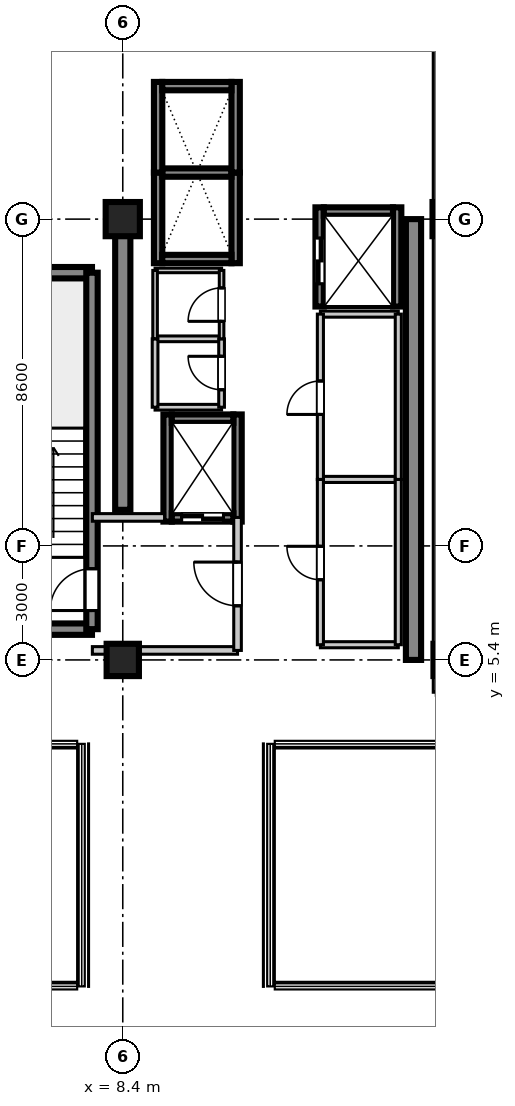
"""IFC4 building model, lengths in metres.
Left out: names, types, materials, properties, quantities, classifications, styles, units other than length and angle.
Written with IfcOpenShell. Run it as: python <this file> out.ifc"""

import sys

from ifc_helpers import new_model, si_unit, direction, frame, frame_2d, origin, origin_2d, place, context, subcontext, project, spatial, rectangle, extrude, source, transform, mapped, element, fill, save


model = new_model("IFC4")
c1 = context("Model", 3, precision=1e-05, world=origin(), true_north=direction((0.0, 1.0)))
c2 = subcontext(c1, "Body", "Model", "MODEL_VIEW")
j1 = project(units=[si_unit("LENGTHUNIT", "METRE"), si_unit("PLANEANGLEUNIT", "RADIAN")], contexts=[c1])
p1 = place(None, origin())
s1 = spatial("IfcSite", under=j1, at=p1, CompositionType="ELEMENT")
p2 = place(p1, origin())
s2 = spatial("IfcBuilding", under=s1, at=p2, CompositionType="ELEMENT")
p3 = place(p2, frame((0.0, 0.0, 311.9)))
s3 = spatial("IfcBuildingStorey", under=s2, at=p3, CompositionType="ELEMENT", Elevation=311.9)
m1 = source(origin(), c2, "Body", "SweptSolid", [
    extrude(rectangle(XDim=0.85, YDim=0.85, at=origin_2d()), origin(), (0.0, 0.0, 1.0), 3.805),
])
p4 = place(p3, frame((8.4, 5.4, 0.0), z_axis=(0.0, 0.0, 1.0), x_axis=(1.0, 0.0, 0.0)))
e1 = element("IfcColumn", 1, at=p4, inside=s3, PredefinedType="PILASTER", context=c2, shape_type="MappedRepresentation", body=[
    mapped(m1, transform((0.0, 0.0, 0.0), scale=1.0)),
])
m2 = source(origin(), c2, "Body", "SweptSolid", [
    extrude(rectangle(XDim=0.9, YDim=0.9, at=origin_2d()), origin(), (0.0, 0.0, 1.0), 3.805),
])
p5 = place(p3, frame((8.4, 17.0, 0.0), z_axis=(0.0, 0.0, 1.0), x_axis=(1.0, 0.0, 0.0)))
e2 = element("IfcColumn", 2, at=p5, inside=s3, PredefinedType="COLUMN", context=c2, shape_type="MappedRepresentation", body=[
    mapped(m2, transform((0.0, 0.0, 0.0), scale=1.0)),
])
p6 = place(p3, frame((17.0, 5.4, 0.0), z_axis=(0.0, 0.0, 1.0), x_axis=(1.0, 0.0, 0.0)))
e3 = element("IfcColumn", 3, at=p6, inside=s3, PredefinedType="PILASTER", context=c2, shape_type="MappedRepresentation", body=[
    mapped(m1, transform((0.0, 0.0, 0.0), scale=1.0)),
])
p7 = place(p3, frame((17.0, 17.0, 0.0), z_axis=(0.0, 0.0, 1.0), x_axis=(1.0, 0.0, 0.0)))
e4 = element("IfcColumn", 4, at=p7, inside=s3, PredefinedType="COLUMN", context=c2, shape_type="MappedRepresentation", body=[
    mapped(m2, transform((0.0, 0.0, 0.0), scale=1.0)),
])
m3 = source(origin(), c2, "Body", "SweptSolid", [
    extrude(rectangle(XDim=7.65, YDim=0.4, at=frame_2d((3.825, 0.0))), origin(), (0.0, 0.0, 1.0), 3.55),
])
p8 = place(p3, frame((8.4, 9.35, 0.0), z_axis=(0.0, 0.0, 1.0), x_axis=(0.0, 1.0, 0.0)))
e5 = element("IfcWall", 5, at=p8, inside=s3, PredefinedType="SHEAR", context=c2, shape_type="MappedRepresentation", body=[
    mapped(m3, transform((0.0, 0.0, 0.0), scale=1.0)),
])
m4 = source(origin(), c2, "Body", "SweptSolid", [
    extrude(rectangle(XDim=11.6, YDim=0.4, at=frame_2d((5.8, 0.0))), origin(), (0.0, 0.0, 1.0), 3.55),
])
p9 = place(p3, frame((16.05, 5.4, 0.0), z_axis=(0.0, 0.0, 1.0), x_axis=(0.0, 1.0, 0.0)))
e6 = element("IfcWall", 6, at=p9, inside=s3, PredefinedType="SHEAR", context=c2, shape_type="MappedRepresentation", body=[
    mapped(m4, transform((0.0, 0.0, 0.0), scale=1.0)),
])
m5 = source(origin(), c2, "Body", "SweptSolid", [
    extrude(rectangle(XDim=3.98, YDim=0.3, at=frame_2d((1.99, 0.0))), origin(), (0.0, 0.0, 1.0), 3.55),
])
for number, where, z_axis, x_axis in (
    (7, (3.61, 6.21, 0.0), (0.0, 0.0, 1.0), (1.0, 0.0, 0.0)),
    (8, (3.61, 15.59, 0.0), (0.0, 0.0, 1.0), (1.0, 0.0, 0.0)),
):
    element("IfcWall", number, at=place(p3, frame(where, z_axis=z_axis, x_axis=x_axis)), inside=s3, PredefinedType="SHEAR", context=c2, shape_type="MappedRepresentation", body=[
        mapped(m5, transform((0.0, 0.0, 0.0), scale=1.0)),
    ])
m6 = source(origin(), c2, "Body", "SweptSolid", [
    extrude(rectangle(XDim=9.38, YDim=0.3, at=frame_2d((4.69, 0.0))), origin(), (0.0, 0.0, 1.0), 3.55),
])
p10 = place(p3, frame((7.59, 6.21, 0.0), z_axis=(0.0, 0.0, 1.0), x_axis=(0.0, 1.0, 0.0)))
e9 = element("IfcWall", 9, at=p10, inside=s3, PredefinedType="SHEAR", context=c2, shape_type="MappedRepresentation", body=[
    mapped(m6, transform((0.0, 0.0, 0.0), scale=1.0)),
])
p11 = place(p10, frame((0.49, 0.0, 0.0)))
e10 = element("IfcOpeningElement", 10, at=p11, cuts=e9, PredefinedType="OPENING", context=c2, shape_type="SweptSolid", body=[
    extrude(rectangle(XDim=1.1, YDim=2.15, at=frame_2d((0.55, 1.075))), frame((0.0, 0.16, 0.0), z_axis=(0.0, -1.0, 0.0), x_axis=(1.0, 0.0, 0.0)), (0.0, 0.0, 1.0), 0.32),
])
m7 = source(origin(), c2, "Body", "SweptSolid", [
    extrude(rectangle(XDim=2.385, YDim=0.22, at=frame_2d((1.192, 0.0))), origin(), (0.0, 0.0, 1.0), 3.55),
])
for number, where, z_axis, x_axis in (
    (11, (9.33, 15.84, 0.0), (0.0, 0.0, 1.0), (0.0, 1.0, 0.0)),
    (12, (11.37, 15.84, 0.0), (0.0, 0.0, 1.0), (0.0, 1.0, 0.0)),
):
    element("IfcWall", number, at=place(p3, frame(where, z_axis=z_axis, x_axis=x_axis)), inside=s3, PredefinedType="SHEAR", context=c2, shape_type="MappedRepresentation", body=[
        mapped(m7, transform((0.0, 0.0, 0.0), scale=1.0)),
    ])
m8 = source(origin(), c2, "Body", "SweptSolid", [
    extrude(rectangle(XDim=1.82, YDim=0.22, at=frame_2d((0.91, 0.0))), origin(), (0.0, 0.0, 1.0), 3.55),
])
p12 = place(p3, frame((9.44, 15.95, 0.0), z_axis=(0.0, 0.0, 1.0), x_axis=(1.0, 0.0, 0.0)))
e13 = element("IfcWall", 13, at=p12, inside=s3, PredefinedType="SHEAR", context=c2, shape_type="MappedRepresentation", body=[
    mapped(m8, transform((0.0, 0.0, 0.0), scale=1.0)),
])
m9 = source(origin(), c2, "Body", "SweptSolid", [
    extrude(rectangle(XDim=1.82, YDim=0.22, at=frame_2d((0.91, 0.0))), origin(), (0.0, 0.0, 1.0), 3.85),
])
p13 = place(p3, frame((9.44, 18.225, 0.0), z_axis=(0.0, 0.0, 1.0), x_axis=(1.0, 0.0, 0.0)))
e14 = element("IfcWall", 14, at=p13, inside=s3, PredefinedType="SHEAR", context=c2, shape_type="MappedRepresentation", body=[
    mapped(m9, transform((0.0, 0.0, 0.0), scale=1.0)),
])
for number, where, z_axis, x_axis in (
    (15, (9.33, 18.225, 0.0), (0.0, 0.0, 1.0), (0.0, 1.0, 0.0)),
    (16, (11.37, 18.225, 0.0), (0.0, 0.0, 1.0), (0.0, 1.0, 0.0)),
):
    element("IfcWall", number, at=place(p3, frame(where, z_axis=z_axis, x_axis=x_axis)), inside=s3, PredefinedType="SHEAR", context=c2, shape_type="MappedRepresentation", body=[
        mapped(m7, transform((0.0, 0.0, 0.0), scale=1.0)),
    ])
p14 = place(p3, frame((9.44, 20.5, 0.0), z_axis=(0.0, 0.0, 1.0), x_axis=(1.0, 0.0, 0.0)))
e17 = element("IfcWall", 17, at=p14, inside=s3, PredefinedType="SHEAR", context=c2, shape_type="MappedRepresentation", body=[
    mapped(m8, transform((0.0, 0.0, 0.0), scale=1.0)),
])
m10 = source(origin(), c2, "Body", "SweptSolid", [
    extrude(rectangle(XDim=2.82, YDim=0.22, at=frame_2d((1.41, 0.0))), origin(), (0.0, 0.0, 1.0), 3.55),
])
for number, where, z_axis, x_axis in (
    (18, (9.58, 9.04, 0.0), (0.0, 0.0, 1.0), (0.0, 1.0, 0.0)),
    (19, (11.42, 9.04, 0.0), (0.0, 0.0, 1.0), (0.0, 1.0, 0.0)),
):
    element("IfcWall", number, at=place(p3, frame(where, z_axis=z_axis, x_axis=x_axis)), inside=s3, PredefinedType="SHEAR", context=c2, shape_type="MappedRepresentation", body=[
        mapped(m10, transform((0.0, 0.0, 0.0), scale=1.0)),
    ])
m11 = source(origin(), c2, "Body", "SweptSolid", [
    extrude(rectangle(XDim=1.62, YDim=0.22, at=frame_2d((0.81, 0.0))), origin(), (0.0, 0.0, 1.0), 3.55),
])
p15 = place(p3, frame((9.69, 9.15, 0.0), z_axis=(0.0, 0.0, 1.0), x_axis=(1.0, 0.0, 0.0)))
e20 = element("IfcWall", 20, at=p15, inside=s3, PredefinedType="SHEAR", context=c2, shape_type="MappedRepresentation", body=[
    mapped(m11, transform((0.0, 0.0, 0.0), scale=1.0)),
])
p16 = place(p15, frame((0.26, 0.0, 0.0)))
e21 = element("IfcOpeningElement", 21, at=p16, cuts=e20, PredefinedType="OPENING", context=c2, shape_type="SweptSolid", body=[
    extrude(rectangle(XDim=1.1, YDim=2.2, at=frame_2d((0.55, 1.1))), frame((0.0, 0.12, 0.0), z_axis=(0.0, -1.0, 0.0), x_axis=(1.0, 0.0, 0.0)), (0.0, 0.0, 1.0), 0.24),
])
p17 = place(p3, frame((9.69, 11.75, 0.0), z_axis=(0.0, 0.0, 1.0), x_axis=(1.0, 0.0, 0.0)))
e22 = element("IfcWall", 22, at=p17, inside=s3, PredefinedType="SHEAR", context=c2, shape_type="MappedRepresentation", body=[
    mapped(m11, transform((0.0, 0.0, 0.0), scale=1.0)),
])
m12 = source(origin(), c2, "Body", "SweptSolid", [
    extrude(rectangle(XDim=2.61, YDim=0.22, at=frame_2d((1.305, 0.0))), origin(), (0.0, 0.0, 1.0), 3.55),
])
p18 = place(p3, frame((13.58, 14.7, 0.0), z_axis=(0.0, 0.0, 1.0), x_axis=(0.0, 1.0, 0.0)))
e23 = element("IfcWall", 23, at=p18, inside=s3, PredefinedType="SHEAR", context=c2, shape_type="MappedRepresentation", body=[
    mapped(m12, transform((0.0, 0.0, 0.0), scale=1.0)),
])
p19 = place(p18, frame((0.6, 0.0, 0.0)))
e24 = element("IfcOpeningElement", 24, at=p19, cuts=e23, PredefinedType="OPENING", context=c2, shape_type="SweptSolid", body=[
    extrude(rectangle(XDim=1.2, YDim=2.2, at=frame_2d((0.6, 1.1))), frame((0.0, 0.12, 0.0), z_axis=(0.0, -1.0, 0.0), x_axis=(1.0, 0.0, 0.0)), (0.0, 0.0, 1.0), 0.24),
])
p20 = place(p3, frame((15.62, 14.7, 0.0), z_axis=(0.0, 0.0, 1.0), x_axis=(0.0, 1.0, 0.0)))
e25 = element("IfcWall", 25, at=p20, inside=s3, PredefinedType="SHEAR", context=c2, shape_type="MappedRepresentation", body=[
    mapped(m12, transform((0.0, 0.0, 0.0), scale=1.0)),
])
p21 = place(p3, frame((13.69, 17.2, 0.0), z_axis=(0.0, 0.0, 1.0), x_axis=(1.0, 0.0, 0.0)))
e26 = element("IfcWall", 26, at=p21, inside=s3, PredefinedType="SHEAR", context=c2, shape_type="MappedRepresentation", body=[
    mapped(m8, transform((0.0, 0.0, 0.0), scale=1.0)),
])
m13 = source(origin(), c2, "Body", "SweptSolid", [
    extrude(rectangle(XDim=3.82, YDim=0.2, at=frame_2d((1.91, 0.0))), origin(), (0.0, 0.0, 1.0), 2.89),
])
p22 = place(p3, frame((7.6, 5.65, 0.0), z_axis=(0.0, 0.0, 1.0), x_axis=(1.0, 0.0, 0.0)))
e27 = element("IfcWall", 27, at=p22, inside=s3, PredefinedType="PARTITIONING", context=c2, shape_type="MappedRepresentation", body=[
    mapped(m13, transform((0.0, 0.0, 0.0), scale=1.0)),
])
m14 = source(origin(), c2, "Body", "SweptSolid", [
    extrude(rectangle(XDim=1.9, YDim=0.2, at=frame_2d((0.95, 0.0))), origin(), (0.0, 0.0, 1.0), 2.89),
])
p23 = place(p3, frame((7.6, 9.15, 0.0), z_axis=(0.0, 0.0, 1.0), x_axis=(1.0, 0.0, 0.0)))
e28 = element("IfcWall", 28, at=p23, inside=s3, PredefinedType="PARTITIONING", context=c2, shape_type="MappedRepresentation", body=[
    mapped(m14, transform((0.0, 0.0, 0.0), scale=1.0)),
])
m15 = source(origin(), c2, "Body", "SweptSolid", [
    extrude(rectangle(XDim=3.5, YDim=0.2, at=frame_2d((1.75, 0.0))), origin(), (0.0, 0.0, 1.0), 2.89),
])
p24 = place(p3, frame((11.42, 5.65, 0.0), z_axis=(0.0, 0.0, 1.0), x_axis=(0.0, 1.0, 0.0)))
e29 = element("IfcWall", 29, at=p24, inside=s3, PredefinedType="PARTITIONING", context=c2, shape_type="MappedRepresentation", body=[
    mapped(m15, transform((0.0, 0.0, 0.0), scale=1.0)),
])
p25 = place(p24, frame((1.175, 0.0, 0.0)))
e30 = element("IfcOpeningElement", 30, at=p25, cuts=e29, PredefinedType="OPENING", context=c2, shape_type="SweptSolid", body=[
    extrude(rectangle(XDim=1.15, YDim=2.15, at=frame_2d((0.575, 1.075))), frame((0.0, 0.11, 0.0), z_axis=(0.0, -1.0, 0.0), x_axis=(1.0, 0.0, 0.0)), (0.0, 0.0, 1.0), 0.22),
])
m16 = source(origin(), c2, "Body", "SweptSolid", [
    extrude(rectangle(XDim=1.75, YDim=0.15, at=frame_2d((0.875, 0.0))), origin(), (0.0, 0.0, 1.0), 2.89),
])
for number, where, z_axis, x_axis in (
    (31, (9.25, 12.05, 0.0), (0.0, 0.0, 1.0), (1.0, 0.0, 0.0)),
    (32, (9.25, 13.85, 0.0), (0.0, 0.0, 1.0), (1.0, 0.0, 0.0)),
):
    element("IfcWall", number, at=place(p3, frame(where, z_axis=z_axis, x_axis=x_axis)), inside=s3, PredefinedType="PARTITIONING", context=c2, shape_type="MappedRepresentation", body=[
        mapped(m16, transform((0.0, 0.0, 0.0), scale=1.0)),
    ])
m17 = source(origin(), c2, "Body", "SweptSolid", [
    extrude(rectangle(XDim=1.8, YDim=0.15, at=frame_2d((0.9, 0.0))), origin(), (0.0, 0.0, 1.0), 2.89),
])
p26 = place(p3, frame((9.25, 12.05, 0.0), z_axis=(0.0, 0.0, 1.0), x_axis=(0.0, 1.0, 0.0)))
e33 = element("IfcWall", 33, at=p26, inside=s3, PredefinedType="PARTITIONING", context=c2, shape_type="MappedRepresentation", body=[
    mapped(m17, transform((0.0, 0.0, 0.0), scale=1.0)),
])
p27 = place(p3, frame((11.0, 12.05, 0.0), z_axis=(0.0, 0.0, 1.0), x_axis=(0.0, 1.0, 0.0)))
e34 = element("IfcWall", 34, at=p27, inside=s3, PredefinedType="PARTITIONING", context=c2, shape_type="MappedRepresentation", body=[
    mapped(m17, transform((0.0, 0.0, 0.0), scale=1.0)),
])
p28 = place(p27, frame((0.46, 0.0, 0.0)))
e35 = element("IfcOpeningElement", 35, at=p28, cuts=e34, PredefinedType="OPENING", context=c2, shape_type="SweptSolid", body=[
    extrude(rectangle(XDim=0.88, YDim=2.1, at=frame_2d((0.44, 1.05))), frame((0.0, 0.085, 0.0), z_axis=(0.0, -1.0, 0.0), x_axis=(1.0, 0.0, 0.0)), (0.0, 0.0, 1.0), 0.17),
])
m18 = source(origin(), c2, "Body", "SweptSolid", [
    extrude(rectangle(XDim=1.75, YDim=0.12, at=frame_2d((0.875, 0.0))), origin(), (0.0, 0.0, 1.0), 2.89),
])
p29 = place(p3, frame((9.25, 15.65, 0.0), z_axis=(0.0, 0.0, 1.0), x_axis=(1.0, 0.0, 0.0)))
e36 = element("IfcWall", 36, at=p29, inside=s3, PredefinedType="PARTITIONING", context=c2, shape_type="MappedRepresentation", body=[
    mapped(m18, transform((0.0, 0.0, 0.0), scale=1.0)),
])
m19 = source(origin(), c2, "Body", "SweptSolid", [
    extrude(rectangle(XDim=1.8, YDim=0.12, at=frame_2d((0.9, 0.0))), origin(), (0.0, 0.0, 1.0), 2.89),
])
p30 = place(p3, frame((9.25, 13.85, 0.0), z_axis=(0.0, 0.0, 1.0), x_axis=(0.0, 1.0, 0.0)))
e37 = element("IfcWall", 37, at=p30, inside=s3, PredefinedType="PARTITIONING", context=c2, shape_type="MappedRepresentation", body=[
    mapped(m19, transform((0.0, 0.0, 0.0), scale=1.0)),
])
p31 = place(p3, frame((11.0, 13.85, 0.0), z_axis=(0.0, 0.0, 1.0), x_axis=(0.0, 1.0, 0.0)))
e38 = element("IfcWall", 38, at=p31, inside=s3, PredefinedType="PARTITIONING", context=c2, shape_type="MappedRepresentation", body=[
    mapped(m19, transform((0.0, 0.0, 0.0), scale=1.0)),
])
p32 = place(p31, frame((0.46, 0.0, 0.0)))
e39 = element("IfcOpeningElement", 39, at=p32, cuts=e38, PredefinedType="OPENING", context=c2, shape_type="SweptSolid", body=[
    extrude(rectangle(XDim=0.88, YDim=2.1, at=frame_2d((0.44, 1.05))), frame((0.0, 0.07, 0.0), z_axis=(0.0, -1.0, 0.0), x_axis=(1.0, 0.0, 0.0)), (0.0, 0.0, 1.0), 0.14),
])
m20 = source(origin(), c2, "Body", "SweptSolid", [
    extrude(rectangle(XDim=2.05, YDim=0.16, at=frame_2d((1.025, 0.0))), origin(), (0.0, 0.0, 1.0), 2.89),
])
for number, where, z_axis, x_axis in (
    (40, (13.6, 5.8, 0.0), (0.0, 0.0, 1.0), (1.0, 0.0, 0.0)),
    (41, (13.6, 10.15, 0.0), (0.0, 0.0, 1.0), (1.0, 0.0, 0.0)),
):
    element("IfcWall", number, at=place(p3, frame(where, z_axis=z_axis, x_axis=x_axis)), inside=s3, PredefinedType="PARTITIONING", context=c2, shape_type="MappedRepresentation", body=[
        mapped(m20, transform((0.0, 0.0, 0.0), scale=1.0)),
    ])
m21 = source(origin(), c2, "Body", "SweptSolid", [
    extrude(rectangle(XDim=4.35, YDim=0.16, at=frame_2d((2.175, 0.0))), origin(), (0.0, 0.0, 1.0), 2.89),
])
p33 = place(p3, frame((13.6, 5.8, 0.0), z_axis=(0.0, 0.0, 1.0), x_axis=(0.0, 1.0, 0.0)))
e42 = element("IfcWall", 42, at=p33, inside=s3, PredefinedType="PARTITIONING", context=c2, shape_type="MappedRepresentation", body=[
    mapped(m21, transform((0.0, 0.0, 0.0), scale=1.0)),
])
p34 = place(p33, frame((1.71, 0.0, 0.0)))
e43 = element("IfcOpeningElement", 43, at=p34, cuts=e42, PredefinedType="OPENING", context=c2, shape_type="SweptSolid", body=[
    extrude(rectangle(XDim=0.88, YDim=2.1, at=frame_2d((0.44, 1.05))), frame((0.0, 0.09, 0.0), z_axis=(0.0, -1.0, 0.0), x_axis=(1.0, 0.0, 0.0)), (0.0, 0.0, 1.0), 0.18),
])
p35 = place(p3, frame((15.65, 5.8, 0.0), z_axis=(0.0, 0.0, 1.0), x_axis=(0.0, 1.0, 0.0)))
e44 = element("IfcWall", 44, at=p35, inside=s3, PredefinedType="PARTITIONING", context=c2, shape_type="MappedRepresentation", body=[
    mapped(m21, transform((0.0, 0.0, 0.0), scale=1.0)),
])
p36 = place(p3, frame((13.6, 14.5, 0.0), z_axis=(0.0, 0.0, 1.0), x_axis=(1.0, 0.0, 0.0)))
e45 = element("IfcWall", 45, at=p36, inside=s3, PredefinedType="PARTITIONING", context=c2, shape_type="MappedRepresentation", body=[
    mapped(m20, transform((0.0, 0.0, 0.0), scale=1.0)),
])
m22 = source(origin(), c2, "Body", "SweptSolid", [
    extrude(rectangle(XDim=4.35, YDim=0.16, at=frame_2d((2.175, 0.0))), origin(), (0.0, 0.0, 1.0), 2.89),
])
p37 = place(p3, frame((13.6, 10.15, 0.0), z_axis=(0.0, 0.0, 1.0), x_axis=(0.0, 1.0, 0.0)))
e46 = element("IfcWall", 46, at=p37, inside=s3, PredefinedType="PARTITIONING", context=c2, shape_type="MappedRepresentation", body=[
    mapped(m22, transform((0.0, 0.0, 0.0), scale=1.0)),
])
p38 = place(p37, frame((1.71, 0.0, 0.0)))
e47 = element("IfcOpeningElement", 47, at=p38, cuts=e46, PredefinedType="OPENING", context=c2, shape_type="SweptSolid", body=[
    extrude(rectangle(XDim=0.88, YDim=2.1, at=frame_2d((0.44, 1.05))), frame((0.0, 0.09, 0.0), z_axis=(0.0, -1.0, 0.0), x_axis=(1.0, 0.0, 0.0)), (0.0, 0.0, 1.0), 0.18),
])
p39 = place(p3, frame((15.65, 10.15, 0.0), z_axis=(0.0, 0.0, 1.0), x_axis=(0.0, 1.0, 0.0)))
e48 = element("IfcWall", 48, at=p39, inside=s3, PredefinedType="PARTITIONING", context=c2, shape_type="MappedRepresentation", body=[
    mapped(m22, transform((0.0, 0.0, 0.0), scale=1.0)),
])
m23 = source(origin(), c2, "Body", "SweptSolid", [
    extrude(rectangle(XDim=17.95, YDim=0.16, at=frame_2d((8.975, 0.0))), origin(), (0.0, 0.0, 1.0), 2.89),
])
p40 = place(p3, frame((16.65, 4.55, 0.0), z_axis=(0.0, 0.0, 1.0), x_axis=(0.0, 1.0, 0.0)))
e49 = element("IfcWall", 49, at=p40, inside=s3, PredefinedType="PARTITIONING", context=c2, shape_type="MappedRepresentation", body=[
    mapped(m23, transform((0.0, 0.0, 0.0), scale=1.0)),
])
m24 = source(origin(), c2, "Body", "SweptSolid", [
    extrude(rectangle(XDim=1.1, YDim=2.15, at=frame_2d((0.55, 1.075))), frame((0.0, 0.025, 0.0), z_axis=(0.0, -1.0, 0.0), x_axis=(1.0, 0.0, 0.0)), (0.0, 0.0, 1.0), 0.05),
])
p41 = place(p11, origin())
e50 = element("IfcDoor", 50, at=p41, inside=s3, OperationType="SINGLE_SWING_LEFT", PredefinedType="DOOR", context=c2, shape_type="MappedRepresentation", body=[
    mapped(m24, transform((0.0, 0.0, 0.0), scale=1.0)),
])
fill(e10, e50)
m25 = source(origin(), c2, "Body", "SweptSolid", [
    extrude(rectangle(XDim=1.1, YDim=2.2, at=frame_2d((0.55, 1.1))), frame((0.0, 0.025, 0.0), z_axis=(0.0, -1.0, 0.0), x_axis=(1.0, 0.0, 0.0)), (0.0, 0.0, 1.0), 0.05),
])
p42 = place(p16, frame((1.1, 0.0, 0.0), z_axis=(0.0, 0.0, 1.0), x_axis=(-1.0, 0.0, 0.0)))
e51 = element("IfcDoor", 51, at=p42, inside=s3, OperationType="DOUBLE_DOOR_SLIDING", PredefinedType="DOOR", context=c2, shape_type="MappedRepresentation", body=[
    mapped(m25, transform((0.0, 0.0, 0.0), scale=1.0)),
])
fill(e21, e51)
m26 = source(origin(), c2, "Body", "SweptSolid", [
    extrude(rectangle(XDim=1.2, YDim=2.2, at=frame_2d((0.6, 1.1))), frame((0.0, 0.025, 0.0), z_axis=(0.0, -1.0, 0.0), x_axis=(1.0, 0.0, 0.0)), (0.0, 0.0, 1.0), 0.05),
])
p43 = place(p19, origin())
e52 = element("IfcDoor", 52, at=p43, inside=s3, OperationType="DOUBLE_DOOR_SLIDING", PredefinedType="DOOR", context=c2, shape_type="MappedRepresentation", body=[
    mapped(m26, transform((0.0, 0.0, 0.0), scale=1.0)),
])
fill(e24, e52)
m27 = source(origin(), c2, "Body", "SweptSolid", [
    extrude(rectangle(XDim=1.15, YDim=2.15, at=frame_2d((0.575, 1.075))), frame((0.0, 0.025, 0.0), z_axis=(0.0, -1.0, 0.0), x_axis=(1.0, 0.0, 0.0)), (0.0, 0.0, 1.0), 0.05),
])
p44 = place(p25, frame((1.15, 0.0, 0.0), z_axis=(0.0, 0.0, 1.0), x_axis=(-1.0, 0.0, 0.0)))
e53 = element("IfcDoor", 53, at=p44, inside=s3, OperationType="SINGLE_SWING_RIGHT", PredefinedType="DOOR", context=c2, shape_type="MappedRepresentation", body=[
    mapped(m27, transform((0.0, 0.0, 0.0), scale=1.0)),
])
fill(e30, e53)
m28 = source(origin(), c2, "Body", "SweptSolid", [
    extrude(rectangle(XDim=0.88, YDim=2.1, at=frame_2d((0.44, 1.05))), frame((0.0, 0.025, 0.0), z_axis=(0.0, -1.0, 0.0), x_axis=(1.0, 0.0, 0.0)), (0.0, 0.0, 1.0), 0.05),
])
p45 = place(p28, origin())
e54 = element("IfcDoor", 54, at=p45, inside=s3, OperationType="SINGLE_SWING_RIGHT", PredefinedType="DOOR", context=c2, shape_type="MappedRepresentation", body=[
    mapped(m28, transform((0.0, 0.0, 0.0), scale=1.0)),
])
fill(e35, e54)
p46 = place(p32, origin())
e55 = element("IfcDoor", 55, at=p46, inside=s3, OperationType="SINGLE_SWING_LEFT", PredefinedType="DOOR", context=c2, shape_type="MappedRepresentation", body=[
    mapped(m28, transform((0.0, 0.0, 0.0), scale=1.0)),
])
fill(e39, e55)
p47 = place(p34, frame((0.88, 0.0, 0.0), z_axis=(0.0, 0.0, 1.0), x_axis=(-1.0, 0.0, 0.0)))
e56 = element("IfcDoor", 56, at=p47, inside=s3, OperationType="SINGLE_SWING_RIGHT", PredefinedType="DOOR", context=c2, shape_type="MappedRepresentation", body=[
    mapped(m28, transform((0.0, 0.0, 0.0), scale=1.0)),
])
fill(e43, e56)
p48 = place(p38, frame((0.88, 0.0, 0.0), z_axis=(0.0, 0.0, 1.0), x_axis=(-1.0, 0.0, 0.0)))
e57 = element("IfcDoor", 57, at=p48, inside=s3, OperationType="SINGLE_SWING_LEFT", PredefinedType="DOOR", context=c2, shape_type="MappedRepresentation", body=[
    mapped(m28, transform((0.0, 0.0, 0.0), scale=1.0)),
])
fill(e47, e57)
save(model, sys.argv[1])
